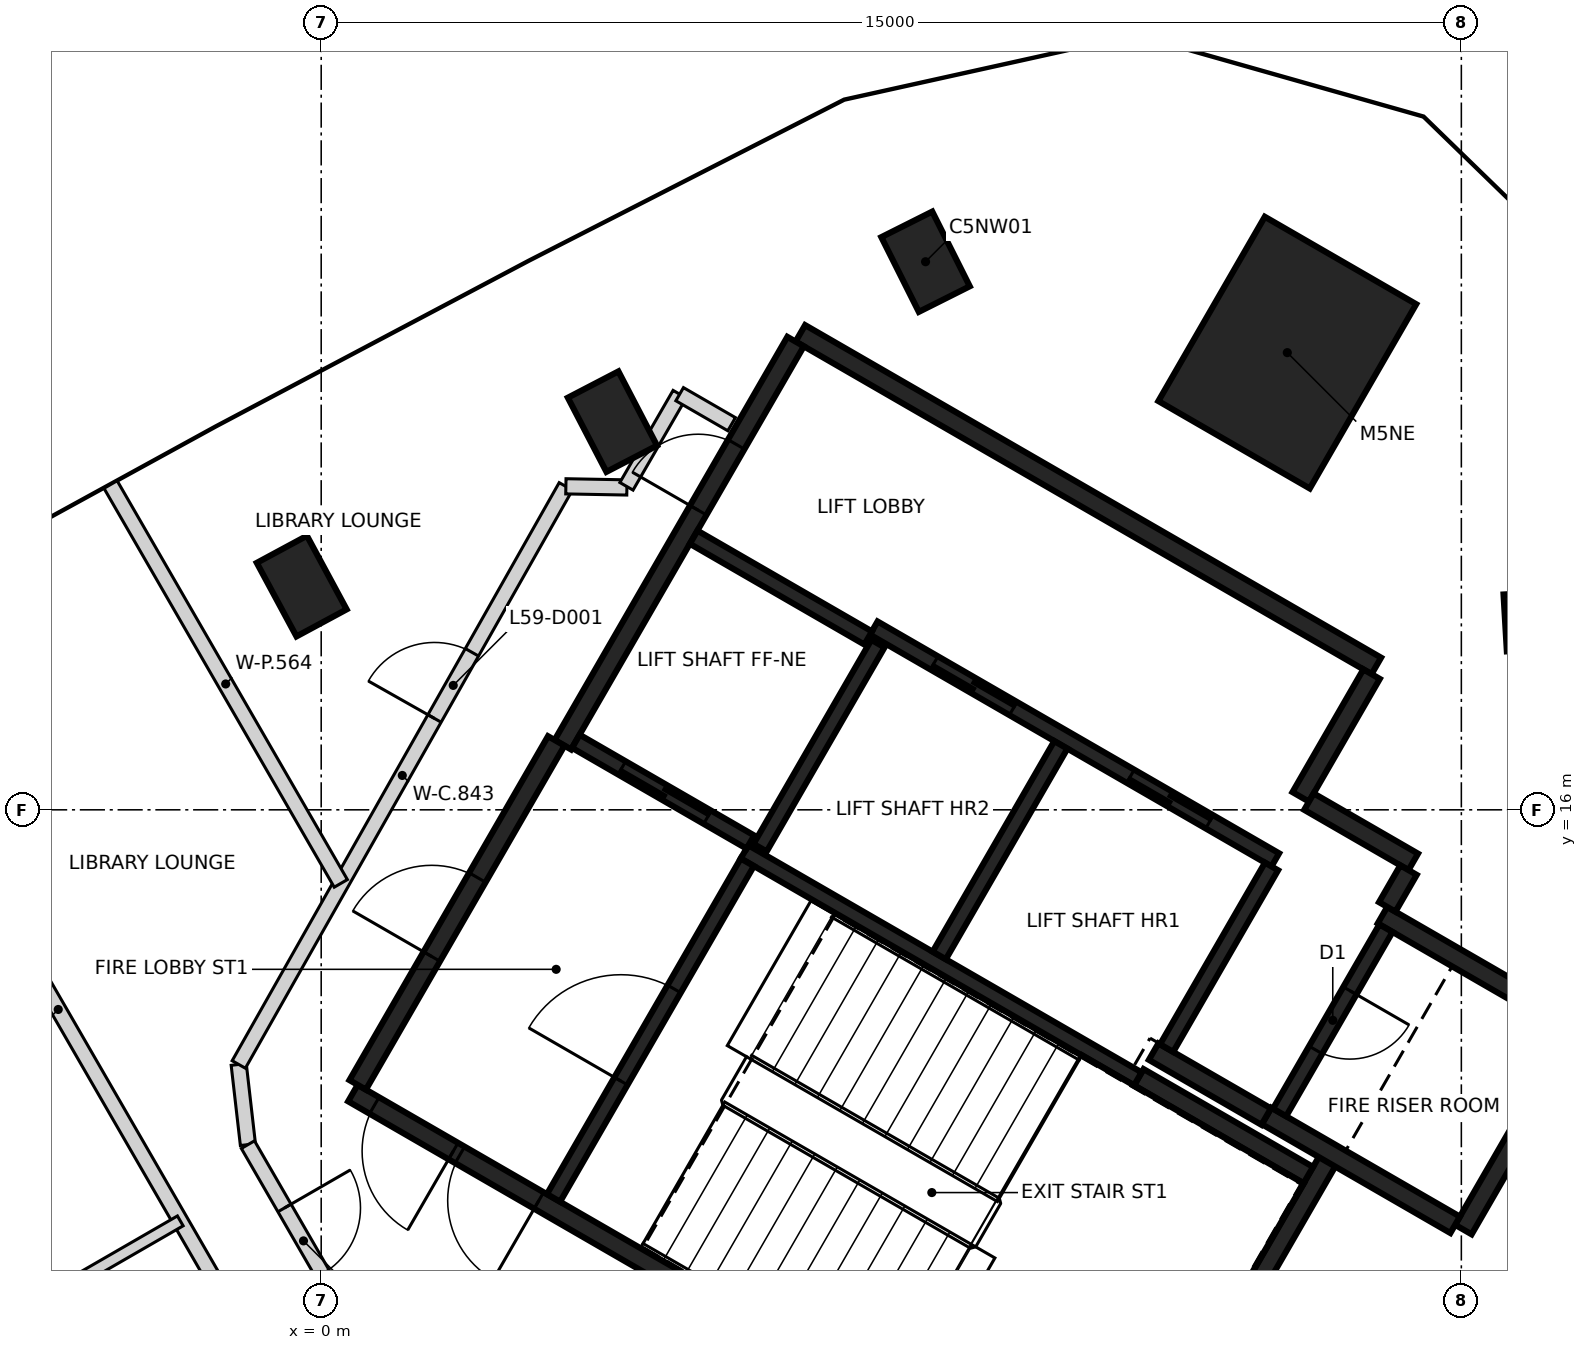
"""IFC4 building model, lengths in metres.
Left out: names, types, materials, properties, quantities, classifications, styles, units other than length and angle.
Written with IfcOpenShell. Run it as: python <this file> out.ifc"""

import sys

from ifc_helpers import new_model, si_unit, direction, frame, frame_2d, origin, origin_2d, place, context, subcontext, project, spatial, rectangle, extrude, element, fill, save


model = new_model("IFC4")
c1 = context("Model", 3, precision=1e-05, world=origin(), true_north=direction((0.0, 1.0)))
c2 = subcontext(c1, "Body", "Model", "MODEL_VIEW")
j1 = project(units=[si_unit("LENGTHUNIT", "METRE"), si_unit("PLANEANGLEUNIT", "RADIAN")], contexts=[c1])
p1 = place(None, origin())
s1 = spatial("IfcSite", under=j1, at=p1, CompositionType="ELEMENT")
p2 = place(p1, origin())
s2 = spatial("IfcBuilding", under=s1, at=p2, CompositionType="ELEMENT")
p3 = place(p2, frame((0.0, 0.0, 235.8)))
s3 = spatial("IfcBuildingStorey", under=s2, at=p3, CompositionType="ELEMENT", Elevation=235.8)
for number, where, z_axis, x_axis in (
    (1, (16.125, 18.491, -0.35), (0.0, 0.0, 1.0), (0.998, 0.058, 0.0)),
    (2, (7.951, 23.211, -0.35), (0.0, 0.0, 1.0), (-0.449, 0.894, 0.0)),
    (3, (3.832, 21.107, -0.35), (0.0, 0.0, 1.0), (-0.461, 0.887, 0.0)),
    (4, (-0.256, 18.943, -0.35), (0.0, 0.0, 1.0), (-0.475, 0.88, 0.0)),
):
    element("IfcColumn", number, at=place(p3, frame(where, z_axis=z_axis, x_axis=x_axis)), inside=s3, PredefinedType="COLUMN", context=c2, shape_type="SweptSolid", body=[
        extrude(rectangle(XDim=1.1, YDim=0.75, at=origin_2d()), origin(), (0.0, 0.0, 1.0), 3.6),
    ])
p4 = place(p3, frame((12.71, 22.015, -0.35), z_axis=(0.0, 0.0, 1.0), x_axis=(0.5, 0.866025403784, 0.0)))
e5 = element("IfcColumn", 5, at=p4, inside=s3, PredefinedType="COLUMN", context=c2, shape_type="SweptSolid", body=[
    extrude(rectangle(XDim=2.8, YDim=2.3, at=origin_2d()), origin(), (0.0, 0.0, 1.0), 3.6),
])
p5 = place(p3, frame((10.42, 6.498, 0.0), z_axis=(0.0, 0.0, 1.0), x_axis=(-0.866021906294, 0.500006057782, 0.0)))
e6 = element("IfcWall", 6, at=p5, inside=s3, PredefinedType="SHEAR", context=c2, shape_type="SweptSolid", body=[
    extrude(rectangle(XDim=11.55, YDim=0.25, at=frame_2d((5.775, 0.0))), origin(), (0.0, 0.0, 1.0), 3.25),
])
p6 = place(p5, frame((10.025, 0.0, 0.0)))
e7 = element("IfcOpeningElement", 7, at=p6, cuts=e6, PredefinedType="OPENING", context=c2, shape_type="SweptSolid", body=[
    extrude(rectangle(XDim=1.2, YDim=2.1, at=frame_2d((0.6, 1.05))), frame((0.0, 0.135, 0.0), z_axis=(0.0, -1.0, 0.0), x_axis=(1.0, 0.0, 0.0)), (0.0, 0.0, 1.0), 0.27),
])
p7 = place(p5, frame((8.725, 0.0, 0.0)))
e8 = element("IfcOpeningElement", 8, at=p7, cuts=e6, PredefinedType="OPENING", context=c2, shape_type="SweptSolid", body=[
    extrude(rectangle(XDim=1.2, YDim=2.1, at=frame_2d((0.6, 1.05))), frame((0.0, 0.135, 0.0), z_axis=(0.0, -1.0, 0.0), x_axis=(1.0, 0.0, 0.0)), (0.0, 0.0, 1.0), 0.27),
])
p8 = place(p3, frame((6.304, 22.269, 0.0), z_axis=(0.0, 0.0, 1.0), x_axis=(0.866022959057, -0.500004234368, 0.0)))
e9 = element("IfcWall", 9, at=p8, inside=s3, PredefinedType="SHEAR", context=c2, shape_type="SweptSolid", body=[
    extrude(rectangle(XDim=8.75, YDim=0.25, at=frame_2d((4.375, 0.0))), origin(), (0.0, 0.0, 1.0), 3.25),
])
p9 = place(p3, frame((3.179, 16.856, 0.0), z_axis=(0.0, 0.0, 1.0), x_axis=(0.500001955336, 0.866024274868, 0.0)))
e10 = element("IfcWall", 10, at=p9, inside=s3, PredefinedType="SHEAR", context=c2, shape_type="SweptSolid", body=[
    extrude(rectangle(XDim=6.125, YDim=0.25, at=frame_2d((3.062, 0.0))), origin(), (0.0, 0.0, 1.0), 3.25),
])
p10 = place(p9, frame((3.563, 0.0, 0.0)))
e11 = element("IfcOpeningElement", 11, at=p10, cuts=e10, PredefinedType="OPENING", context=c2, shape_type="SweptSolid", body=[
    extrude(rectangle(XDim=1.0, YDim=2.1, at=frame_2d((0.5, 1.05))), frame((0.0, 0.135, 0.0), z_axis=(0.0, -1.0, 0.0), x_axis=(1.0, 0.0, 0.0)), (0.0, 0.0, 1.0), 0.27),
])
p11 = place(p3, frame((0.48, 12.381, 0.0), z_axis=(0.0, 0.0, 1.0), x_axis=(0.49999885962, 0.866026062182, 0.0)))
e12 = element("IfcWall", 12, at=p11, inside=s3, PredefinedType="SHEAR", context=c2, shape_type="SweptSolid", body=[
    extrude(rectangle(XDim=5.225, YDim=0.25, at=frame_2d((2.612, 0.0))), origin(), (0.0, 0.0, 1.0), 3.25),
])
p12 = place(p11, frame((1.95, 0.0, 0.0)))
e13 = element("IfcOpeningElement", 13, at=p12, cuts=e12, PredefinedType="OPENING", context=c2, shape_type="SweptSolid", body=[
    extrude(rectangle(XDim=1.2, YDim=2.1, at=frame_2d((0.6, 1.05))), frame((0.0, 0.135, 0.0), z_axis=(0.0, -1.0, 0.0), x_axis=(1.0, 0.0, 0.0)), (0.0, 0.0, 1.0), 0.27),
])
p13 = place(p3, frame((13.238, 11.378, 0.0), z_axis=(0.0, 0.0, 1.0), x_axis=(-0.500008851346, -0.866020293397, 0.0)))
e14 = element("IfcWall", 14, at=p13, inside=s3, PredefinedType="SHEAR", context=c2, shape_type="SweptSolid", body=[
    extrude(rectangle(XDim=5.51, YDim=0.25, at=frame_2d((2.755, 0.0))), origin(), (0.0, 0.0, 1.0), 3.25),
])
p14 = place(p3, frame((16.684, 13.347, 0.0), z_axis=(0.0, 0.0, 1.0), x_axis=(-0.499998874531, -0.866026053573, 0.0)))
e15 = element("IfcWall", 15, at=p14, inside=s3, PredefinedType="SHEAR", context=c2, shape_type="SweptSolid", body=[
    extrude(rectangle(XDim=3.313, YDim=0.25, at=frame_2d((1.656, 0.0))), origin(), (0.0, 0.0, 1.0), 3.25),
])
p15 = place(p3, frame((14.918, 10.54, 0.0), z_axis=(0.0, 0.0, 1.0), x_axis=(-0.866063538972, 0.499933942099, 0.0)))
e16 = element("IfcWall", 16, at=p15, inside=s3, PredefinedType="SHEAR", context=c2, shape_type="SweptSolid", body=[
    extrude(rectangle(XDim=2.865, YDim=0.25, at=frame_2d((1.432, 0.0))), origin(), (0.0, 0.0, 1.0), 3.25),
])
p16 = place(p3, frame((13.963, 14.614, 0.0), z_axis=(0.0, 0.0, 1.0), x_axis=(0.866042235819, -0.499970844928, 0.0)))
e17 = element("IfcWall", 17, at=p16, inside=s3, PredefinedType="SHEAR", context=c2, shape_type="SweptSolid", body=[
    extrude(rectangle(XDim=2.865, YDim=0.25, at=frame_2d((1.432, 0.0))), origin(), (0.0, 0.0, 1.0), 3.25),
])
p17 = place(p3, frame((10.757, 12.481, 0.0), z_axis=(0.0, 0.0, 1.0), x_axis=(0.866022940537, -0.500004266446, 0.0)))
e18 = element("IfcWall", 18, at=p17, inside=s3, PredefinedType="SHEAR", context=c2, shape_type="SweptSolid", body=[
    extrude(rectangle(XDim=2.575, YDim=0.25, at=frame_2d((1.287, 0.0))), origin(), (0.0, 0.0, 1.0), 3.25),
])
p18 = place(p3, frame((13.819, 17.785, 0.0), z_axis=(0.0, 0.0, 1.0), x_axis=(-0.500039802285, -0.866002422705, 0.0)))
e19 = element("IfcWall", 19, at=p18, inside=s3, PredefinedType="SHEAR", context=c2, shape_type="SweptSolid", body=[
    extrude(rectangle(XDim=1.865, YDim=0.25, at=frame_2d((0.932, 0.0))), origin(), (0.0, 0.0, 1.0), 3.25),
])
p19 = place(p3, frame((12.433, 11.964, 0.0), z_axis=(0.0, 0.0, 1.0), x_axis=(-0.866038183914, 0.499977863513, 0.0)))
e20 = element("IfcWall", 20, at=p19, inside=s3, PredefinedType="SHEAR", context=c2, shape_type="SweptSolid", body=[
    extrude(rectangle(XDim=1.71, YDim=0.25, at=frame_2d((0.855, 0.0))), origin(), (0.0, 0.0, 1.0), 3.25),
])
p20 = place(p3, frame((12.995, 16.108, 0.0), z_axis=(0.0, 0.0, 1.0), x_axis=(0.866044474677, -0.49996696679, 0.0)))
e21 = element("IfcWall", 21, at=p20, inside=s3, PredefinedType="SHEAR", context=c2, shape_type="SweptSolid", body=[
    extrude(rectangle(XDim=1.584, YDim=0.25, at=frame_2d((0.792, 0.0))), origin(), (0.0, 0.0, 1.0), 3.25),
])
p21 = place(p3, frame((14.305, 15.207, 0.0), z_axis=(0.0, 0.0, 1.0), x_axis=(-0.499848422343, -0.866112899501, 0.0)))
e22 = element("IfcWall", 22, at=p21, inside=s3, PredefinedType="SHEAR", context=c2, shape_type="SweptSolid", body=[
    extrude(rectangle(XDim=0.559, YDim=0.25, at=frame_2d((0.28, 0.0))), origin(), (0.0, 0.0, 1.0), 3.25),
])
p22 = place(p3, frame((12.552, 15.342, 0.0), z_axis=(0.0, 0.0, 1.0), x_axis=(-0.866030299012, 0.499991521122, 0.0)))
e23 = element("IfcWall", 23, at=p22, inside=s3, PredefinedType="SHEAR", context=c2, shape_type="SweptSolid", body=[
    extrude(rectangle(XDim=6.1, YDim=0.2, at=frame_2d((3.05, 0.0))), origin(), (0.0, 0.0, 1.0), 3.25),
])
p23 = place(p22, frame((1.0, 0.0, 0.0)))
e24 = element("IfcOpeningElement", 24, at=p23, cuts=e23, PredefinedType="OPENING", context=c2, shape_type="SweptSolid", body=[
    extrude(rectangle(XDim=1.2, YDim=2.1, at=frame_2d((0.6, 1.05))), frame((0.0, 0.11, 0.0), z_axis=(0.0, -1.0, 0.0), x_axis=(1.0, 0.0, 0.0)), (0.0, 0.0, 1.0), 0.22),
])
p24 = place(p22, frame((3.982, 0.0, 0.0)))
e25 = element("IfcOpeningElement", 25, at=p24, cuts=e23, PredefinedType="OPENING", context=c2, shape_type="SweptSolid", body=[
    extrude(rectangle(XDim=1.2, YDim=2.1, at=frame_2d((0.6, 1.05))), frame((0.0, 0.11, 0.0), z_axis=(0.0, -1.0, 0.0), x_axis=(1.0, 0.0, 0.0)), (0.0, 0.0, 1.0), 0.22),
])
p25 = place(p3, frame((10.743, 12.46, 0.0), z_axis=(0.0, 0.0, 1.0), x_axis=(-0.866018848283, 0.500011354289, 0.0)))
e26 = element("IfcWall", 26, at=p25, inside=s3, PredefinedType="SHEAR", context=c2, shape_type="SweptSolid", body=[
    extrude(rectangle(XDim=5.974, YDim=0.2, at=frame_2d((2.987, 0.0))), origin(), (0.0, 0.0, 1.0), 3.25),
])
p26 = place(p3, frame((3.057, 10.895, 0.0), z_axis=(0.0, 0.0, 1.0), x_axis=(0.500027839223, 0.866009330205, 0.0)))
e27 = element("IfcWall", 27, at=p26, inside=s3, PredefinedType="SHEAR", context=c2, shape_type="SweptSolid", body=[
    extrude(rectangle(XDim=5.098, YDim=0.2, at=frame_2d((2.549, 0.0))), origin(), (0.0, 0.0, 1.0), 3.25),
])
p27 = place(p26, frame((1.774, 0.0, 0.0)))
e28 = element("IfcOpeningElement", 28, at=p27, cuts=e27, PredefinedType="OPENING", context=c2, shape_type="SweptSolid", body=[
    extrude(rectangle(XDim=1.4, YDim=2.1, at=frame_2d((0.7, 1.05))), frame((0.0, 0.11, 0.0), z_axis=(0.0, -1.0, 0.0), x_axis=(1.0, 0.0, 0.0)), (0.0, 0.0, 1.0), 0.22),
])
p28 = place(p3, frame((8.132, 14.084, 0.0), z_axis=(0.0, 0.0, 1.0), x_axis=(0.500030834389, 0.86600760081, 0.0)))
e29 = element("IfcWall", 29, at=p28, inside=s3, PredefinedType="SHEAR", context=c2, shape_type="SweptSolid", body=[
    extrude(rectangle(XDim=3.198, YDim=0.2, at=frame_2d((1.599, 0.0))), origin(), (0.0, 0.0, 1.0), 3.25),
])
p29 = place(p3, frame((14.008, 14.442, 0.0), z_axis=(0.0, 0.0, 1.0), x_axis=(-0.499986818241, -0.866033014143, 0.0)))
e30 = element("IfcWall", 30, at=p29, inside=s3, PredefinedType="SHEAR", context=c2, shape_type="SweptSolid", body=[
    extrude(rectangle(XDim=2.798, YDim=0.2, at=frame_2d((1.399, 0.0))), origin(), (0.0, 0.0, 1.0), 3.25),
])
p30 = place(p29, frame((0.949, 0.0, 0.0)))
e31 = element("IfcOpeningElement", 31, at=p30, cuts=e30, PredefinedType="OPENING", context=c2, shape_type="SweptSolid", body=[
    extrude(rectangle(XDim=0.9, YDim=2.1, at=frame_2d((0.45, 1.05))), frame((0.0, 0.11, 0.0), z_axis=(0.0, -1.0, 0.0), x_axis=(1.0, 0.0, 0.0)), (0.0, 0.0, 1.0), 0.22),
])
p31 = place(p3, frame((12.502, 15.255, 0.0), z_axis=(0.0, 0.0, 1.0), x_axis=(-0.499965018551, -0.866045599391, 0.0)))
e32 = element("IfcWall", 32, at=p31, inside=s3, PredefinedType="SHEAR", context=c2, shape_type="SweptSolid", body=[
    extrude(rectangle(XDim=2.759, YDim=0.2, at=frame_2d((1.379, 0.0))), origin(), (0.0, 0.0, 1.0), 3.25),
])
p32 = place(p3, frame((7.324, 18.187, 0.0), z_axis=(0.0, 0.0, 1.0), x_axis=(-0.499967891604, -0.866043940782, 0.0)))
e33 = element("IfcWall", 33, at=p32, inside=s3, PredefinedType="SHEAR", context=c2, shape_type="SweptSolid", body=[
    extrude(rectangle(XDim=3.1, YDim=0.2, at=frame_2d((1.55, 0.0))), origin(), (0.0, 0.0, 1.0), 3.25),
])
p33 = place(p3, frame((5.646, 15.576, 0.0), z_axis=(0.0, 0.0, 1.0), x_axis=(-0.866018407898, 0.500012117035, 0.0)))
e34 = element("IfcWall", 34, at=p33, inside=s3, PredefinedType="SHEAR", context=c2, shape_type="SweptSolid", body=[
    extrude(rectangle(XDim=2.651, YDim=0.2, at=frame_2d((1.325, 0.0))), origin(), (0.0, 0.0, 1.0), 3.25),
])
p34 = place(p33, frame((0.652, 0.0, 0.0)))
e35 = element("IfcOpeningElement", 35, at=p34, cuts=e34, PredefinedType="OPENING", context=c2, shape_type="SweptSolid", body=[
    extrude(rectangle(XDim=1.3, YDim=2.1, at=frame_2d((0.65, 1.05))), frame((0.0, 0.11, 0.0), z_axis=(0.0, -1.0, 0.0), x_axis=(1.0, 0.0, 0.0)), (0.0, 0.0, 1.0), 0.22),
])
p35 = place(p3, frame((7.196, 18.26, 0.0), z_axis=(0.0, 0.0, 1.0), x_axis=(-0.866018407898, 0.500012117035, 0.0)))
e36 = element("IfcWall", 36, at=p35, inside=s3, PredefinedType="SHEAR", context=c2, shape_type="SweptSolid", body=[
    extrude(rectangle(XDim=2.651, YDim=0.2, at=frame_2d((1.325, 0.0))), origin(), (0.0, 0.0, 1.0), 3.25),
])
p36 = place(p3, frame((-1.085, 12.65, 0.0), z_axis=(0.0, 0.0, 1.0), x_axis=(0.113812454263, -0.993502252264, 0.0)))
e37 = element("IfcWall", 37, at=p36, inside=s3, PredefinedType="PARTITIONING", context=c2, shape_type="SweptSolid", body=[
    extrude(rectangle(XDim=1.062, YDim=0.2, at=frame_2d((0.531, 0.0))), origin(), (0.0, 0.0, 1.0), 3.25),
])
p37 = place(p3, frame((-1.084, 12.65, 0.0), z_axis=(0.0, 0.0, 1.0), x_axis=(0.492373019537, 0.87038428848, 0.0)))
e38 = element("IfcWall", 38, at=p37, inside=s3, PredefinedType="PARTITIONING", context=c2, shape_type="SweptSolid", body=[
    extrude(rectangle(XDim=8.738, YDim=0.2, at=frame_2d((4.369, 0.0))), origin(), (0.0, 0.0, 1.0), 3.25),
])
p38 = place(p37, frame((5.23, 0.0, 0.0)))
e39 = element("IfcOpeningElement", 39, at=p38, cuts=e38, PredefinedType="OPENING", context=c2, shape_type="SweptSolid", body=[
    extrude(rectangle(XDim=1.0, YDim=2.1, at=frame_2d((0.5, 1.05))), frame((0.0, 0.11, 0.0), z_axis=(0.0, -1.0, 0.0), x_axis=(1.0, 0.0, 0.0)), (0.0, 0.0, 1.0), 0.22),
])
p39 = place(p3, frame((-0.964, 11.595, 0.0), z_axis=(0.0, 0.0, 1.0), x_axis=(0.500081432713, -0.865978383481, 0.0)))
e40 = element("IfcWall", 40, at=p39, inside=s3, PredefinedType="PARTITIONING", context=c2, shape_type="SweptSolid", body=[
    extrude(rectangle(XDim=2.924, YDim=0.2, at=frame_2d((1.462, 0.0))), origin(), (0.0, 0.0, 1.0), 3.25),
])
p40 = place(p39, frame((0.962, 0.0, 0.0)))
e41 = element("IfcOpeningElement", 41, at=p40, cuts=e40, PredefinedType="OPENING", context=c2, shape_type="SweptSolid", body=[
    extrude(rectangle(XDim=1.0, YDim=2.1, at=frame_2d((0.5, 1.05))), frame((0.0, 0.11, 0.0), z_axis=(0.0, -1.0, 0.0), x_axis=(1.0, 0.0, 0.0)), (0.0, 0.0, 1.0), 0.22),
])
p41 = place(p3, frame((3.219, 20.256, 0.0), z_axis=(0.0, 0.0, 1.0), x_axis=(0.99982237262, -0.0188473661, 0.0)))
e42 = element("IfcWall", 42, at=p41, inside=s3, PredefinedType="PARTITIONING", context=c2, shape_type="SweptSolid", body=[
    extrude(rectangle(XDim=0.803, YDim=0.2, at=frame_2d((0.402, 0.0))), origin(), (0.0, 0.0, 1.0), 3.25),
])
p42 = place(p3, frame((4.016, 20.256, 0.0), z_axis=(0.0, 0.0, 1.0), x_axis=(0.500135180047, 0.865947343479, 0.0)))
e43 = element("IfcWall", 43, at=p42, inside=s3, PredefinedType="PARTITIONING", context=c2, shape_type="SweptSolid", body=[
    extrude(rectangle(XDim=1.399, YDim=0.2, at=frame_2d((0.7, 0.0))), origin(), (0.0, 0.0, 1.0), 2.35),
])
p43 = place(p3, frame((4.716, 21.468, 0.0), z_axis=(0.0, 0.0, 1.0), x_axis=(0.865912682783, -0.500195187698, 0.0)))
e44 = element("IfcWall", 44, at=p43, inside=s3, PredefinedType="PARTITIONING", context=c2, shape_type="SweptSolid", body=[
    extrude(rectangle(XDim=0.79, YDim=0.2, at=frame_2d((0.395, 0.0))), origin(), (0.0, 0.0, 1.0), 2.35),
])
p44 = place(p3, frame((-6.315, 18.32, 0.0), z_axis=(0.0, 0.0, 1.0), x_axis=(0.500012296027, -0.866018304553, 0.0)))
e45 = element("IfcWall", 45, at=p44, inside=s3, PredefinedType="PARTITIONING", context=c2, shape_type="SweptSolid", body=[
    extrude(rectangle(XDim=11.423, YDim=0.2, at=frame_2d((5.711, 0.0))), origin(), (0.0, 0.0, 1.0), 2.35),
])
p45 = place(p3, frame((-2.771, 20.279, 0.0), z_axis=(0.0, 0.0, 1.0), x_axis=(0.499939878606, -0.866060112105, 0.0)))
e46 = element("IfcWall", 46, at=p45, inside=s3, PredefinedType="PARTITIONING", context=c2, shape_type="SweptSolid", body=[
    extrude(rectangle(XDim=6.059, YDim=0.2, at=frame_2d((3.029, 0.0))), origin(), (0.0, 0.0, 1.0), 2.35),
])
p46 = place(p3, frame((-3.664, 9.547, 0.0), z_axis=(0.0, 0.0, 1.0), x_axis=(0.866049423672, 0.499958394027, 0.0)))
e47 = element("IfcWall", 47, at=p46, inside=s3, PredefinedType="PARTITIONING", context=c2, shape_type="SweptSolid", body=[
    extrude(rectangle(XDim=2.09, YDim=0.15, at=frame_2d((1.045, 0.0))), origin(), (0.0, 0.0, 1.0), 3.25),
])
p47 = place(p34, origin())
e48 = element("IfcDoor", 48, at=p47, inside=s3, OperationType="SLIDING_TO_LEFT", PredefinedType="DOOR", context=c2, shape_type="SweptSolid", body=[
    extrude(rectangle(XDim=1.3, YDim=2.1, at=frame_2d((0.65, 1.05))), frame((0.0, 0.025, 0.0), z_axis=(0.0, -1.0, 0.0), x_axis=(1.0, 0.0, 0.0)), (0.0, 0.0, 1.0), 0.05),
])
fill(e35, e48)
p48 = place(p23, origin())
e49 = element("IfcDoor", 49, at=p48, inside=s3, OperationType="DOUBLE_DOOR_SLIDING", PredefinedType="DOOR", context=c2, shape_type="SweptSolid", body=[
    extrude(rectangle(XDim=1.2, YDim=2.1, at=frame_2d((0.6, 1.05))), frame((0.0, 0.025, 0.0), z_axis=(0.0, -1.0, 0.0), x_axis=(1.0, 0.0, 0.0)), (0.0, 0.0, 1.0), 0.05),
])
fill(e24, e49)
p49 = place(p24, origin())
e50 = element("IfcDoor", 50, at=p49, inside=s3, OperationType="DOUBLE_DOOR_SLIDING", PredefinedType="DOOR", context=c2, shape_type="SweptSolid", body=[
    extrude(rectangle(XDim=1.2, YDim=2.1, at=frame_2d((0.6, 1.05))), frame((0.0, 0.025, 0.0), z_axis=(0.0, -1.0, 0.0), x_axis=(1.0, 0.0, 0.0)), (0.0, 0.0, 1.0), 0.05),
])
fill(e25, e50)
p50 = place(p10, origin())
e51 = element("IfcDoor", 51, at=p50, inside=s3, OperationType="SINGLE_SWING_LEFT", PredefinedType="DOOR", context=c2, shape_type="SweptSolid", body=[
    extrude(rectangle(XDim=1.0, YDim=2.1, at=frame_2d((0.5, 1.05))), frame((0.0, 0.025, 0.0), z_axis=(0.0, -1.0, 0.0), x_axis=(1.0, 0.0, 0.0)), (0.0, 0.0, 1.0), 0.05),
])
fill(e11, e51)
p51 = place(p6, origin())
e52 = element("IfcDoor", 52, at=p51, inside=s3, OperationType="SINGLE_SWING_LEFT", PredefinedType="DOOR", context=c2, shape_type="SweptSolid", body=[
    extrude(rectangle(XDim=1.2, YDim=2.1, at=frame_2d((0.6, 1.05))), frame((0.0, 0.025, 0.0), z_axis=(0.0, -1.0, 0.0), x_axis=(1.0, 0.0, 0.0)), (0.0, 0.0, 1.0), 0.05),
])
fill(e7, e52)
p52 = place(p7, origin())
e53 = element("IfcDoor", 53, at=p52, inside=s3, OperationType="SINGLE_SWING_RIGHT", PredefinedType="DOOR", context=c2, shape_type="SweptSolid", body=[
    extrude(rectangle(XDim=1.2, YDim=2.1, at=frame_2d((0.6, 1.05))), frame((0.0, 0.025, 0.0), z_axis=(0.0, -1.0, 0.0), x_axis=(1.0, 0.0, 0.0)), (0.0, 0.0, 1.0), 0.05),
])
fill(e8, e53)
p53 = place(p27, origin())
e54 = element("IfcDoor", 54, at=p53, inside=s3, OperationType="SINGLE_SWING_LEFT", PredefinedType="DOOR", context=c2, shape_type="SweptSolid", body=[
    extrude(rectangle(XDim=1.4, YDim=2.1, at=frame_2d((0.7, 1.05))), frame((0.0, 0.025, 0.0), z_axis=(0.0, -1.0, 0.0), x_axis=(1.0, 0.0, 0.0)), (0.0, 0.0, 1.0), 0.05),
])
fill(e28, e54)
p54 = place(p30, origin())
e55 = element("IfcDoor", 55, at=p54, inside=s3, OperationType="SINGLE_SWING_RIGHT", PredefinedType="DOOR", context=c2, shape_type="SweptSolid", body=[
    extrude(rectangle(XDim=0.9, YDim=2.1, at=frame_2d((0.45, 1.05))), frame((0.0, 0.025, 0.0), z_axis=(0.0, -1.0, 0.0), x_axis=(1.0, 0.0, 0.0)), (0.0, 0.0, 1.0), 0.05),
])
fill(e31, e55)
p55 = place(p12, origin())
e56 = element("IfcDoor", 56, at=p55, inside=s3, OperationType="SINGLE_SWING_RIGHT", PredefinedType="DOOR", context=c2, shape_type="SweptSolid", body=[
    extrude(rectangle(XDim=1.2, YDim=2.1, at=frame_2d((0.6, 1.05))), frame((0.0, 0.025, 0.0), z_axis=(0.0, -1.0, 0.0), x_axis=(1.0, 0.0, 0.0)), (0.0, 0.0, 1.0), 0.05),
])
fill(e13, e56)
p56 = place(p38, origin())
e57 = element("IfcDoor", 57, at=p56, inside=s3, OperationType="SINGLE_SWING_LEFT", PredefinedType="DOOR", context=c2, shape_type="SweptSolid", body=[
    extrude(rectangle(XDim=1.0, YDim=2.1, at=frame_2d((0.5, 1.05))), frame((0.0, 0.025, 0.0), z_axis=(0.0, -1.0, 0.0), x_axis=(1.0, 0.0, 0.0)), (0.0, 0.0, 1.0), 0.05),
])
fill(e39, e57)
p57 = place(p40, origin())
e58 = element("IfcDoor", 58, at=p57, inside=s3, OperationType="SINGLE_SWING_LEFT", PredefinedType="DOOR", context=c2, shape_type="SweptSolid", body=[
    extrude(rectangle(XDim=1.0, YDim=2.1, at=frame_2d((0.5, 1.05))), frame((0.0, 0.025, 0.0), z_axis=(0.0, -1.0, 0.0), x_axis=(1.0, 0.0, 0.0)), (0.0, 0.0, 1.0), 0.05),
])
fill(e41, e58)
save(model, sys.argv[1])
